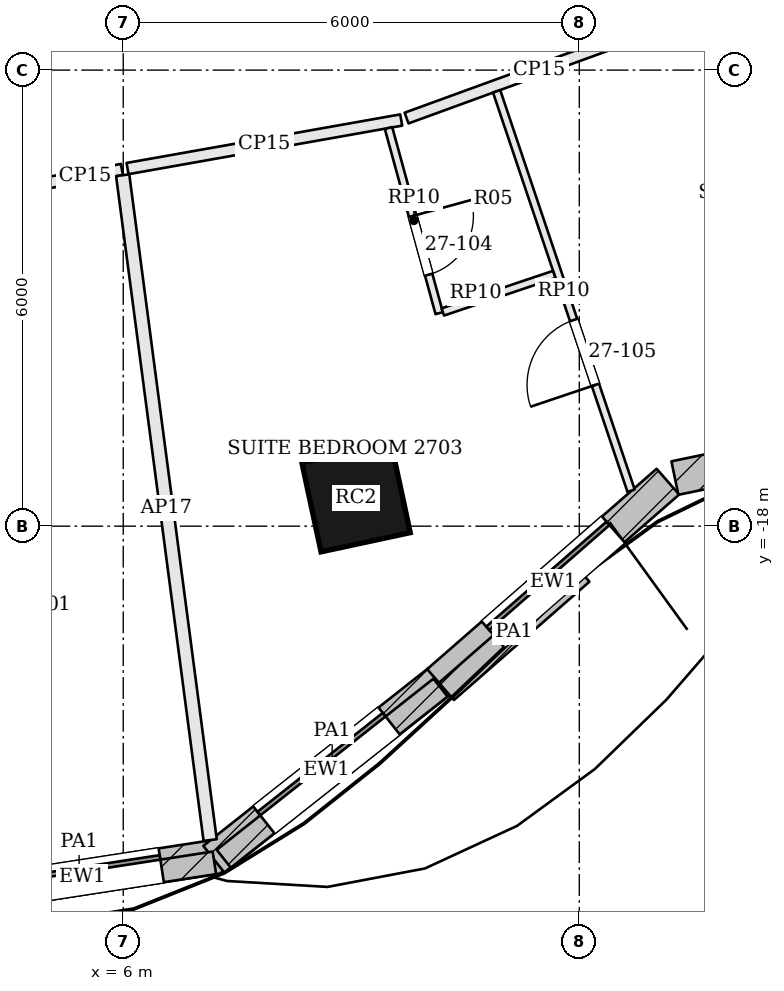
"""IFC4 building model, lengths in metres.
Left out: names, types, materials, properties, quantities, classifications, styles, units other than length and angle.
Written with IfcOpenShell. Run it as: python <this file> out.ifc"""

import sys

from ifc_helpers import new_model, si_unit, direction, frame, frame_2d, origin, origin_2d, place, context, subcontext, project, spatial, rectangle, extrude, element, fill, save


model = new_model("IFC4")
c1 = context("Model", 3, precision=1e-05, world=origin(), true_north=direction((0.0, 1.0)))
c2 = subcontext(c1, "Body", "Model", "MODEL_VIEW")
j1 = project(units=[si_unit("LENGTHUNIT", "METRE"), si_unit("PLANEANGLEUNIT", "RADIAN")], contexts=[c1])
p1 = place(None, origin())
s1 = spatial("IfcSite", under=j1, at=p1, CompositionType="ELEMENT")
p2 = place(p1, origin())
s2 = spatial("IfcBuilding", under=s1, at=p2, CompositionType="ELEMENT")
p3 = place(p2, frame((0.0, 0.0, 114.0)))
s3 = spatial("IfcBuildingStorey", under=s2, at=p3, CompositionType="ELEMENT", Elevation=114.0)
p4 = place(p3, frame((9.063, -17.625, 0.0), z_axis=(0.0, 0.0, 1.0), x_axis=(0.977652674797, 0.210226657352, 0.0)))
e1 = element("IfcColumn", 1, at=p4, inside=s3, PredefinedType="COLUMN", context=c2, shape_type="SweptSolid", body=[
    extrude(rectangle(XDim=1.2, YDim=1.2, at=origin_2d()), origin(), (0.0, 0.0, 1.0), 3.6),
])
p5 = place(p3, frame((3.629, -22.905, 0.0), z_axis=(0.0, 0.0, 1.0), x_axis=(0.988300084321, 0.152521943772, 0.0)))
e2 = element("IfcWall", 2, at=p5, inside=s3, PredefinedType="SOLIDWALL", context=c2, shape_type="SweptSolid", body=[
    extrude(rectangle(XDim=3.71, YDim=0.45, at=frame_2d((1.855, 0.0))), origin(), (0.0, 0.0, 1.0), 3.4),
])
p6 = place(p5, frame((0.805, 0.0, 0.9)))
e3 = element("IfcOpeningElement", 3, at=p6, cuts=e2, PredefinedType="OPENING", context=c2, shape_type="SweptSolid", body=[
    extrude(rectangle(XDim=2.1, YDim=2.0, at=frame_2d((1.05, 1.0))), frame((0.0, 0.235, 0.0), z_axis=(0.0, -1.0, 0.0), x_axis=(1.0, 0.0, 0.0)), (0.0, 0.0, 1.0), 0.47),
])
p7 = place(p3, frame((7.193, -22.383, 0.0), z_axis=(0.0, 0.0, 1.0), x_axis=(0.784803291184, 0.619744942816, 0.0)))
e4 = element("IfcWall", 4, at=p7, inside=s3, PredefinedType="SOLIDWALL", context=c2, shape_type="SweptSolid", body=[
    extrude(rectangle(XDim=3.775, YDim=0.45, at=frame_2d((1.887, 0.0))), origin(), (0.0, 0.0, 1.0), 3.4),
])
p8 = place(p7, frame((0.837, 0.0, 0.9)))
e5 = element("IfcOpeningElement", 5, at=p8, cuts=e4, PredefinedType="OPENING", context=c2, shape_type="SweptSolid", body=[
    extrude(rectangle(XDim=2.1, YDim=2.0, at=frame_2d((1.05, 1.0))), frame((0.0, 0.235, 0.0), z_axis=(0.0, -1.0, 0.0), x_axis=(1.0, 0.0, 0.0)), (0.0, 0.0, 1.0), 0.47),
])
p9 = place(p3, frame((10.146, -20.051, 0.0), z_axis=(0.0, 0.0, 1.0), x_axis=(0.753278140428, 0.657702093013, 0.0)))
e6 = element("IfcWall", 6, at=p9, inside=s3, PredefinedType="SOLIDWALL", context=c2, shape_type="SweptSolid", body=[
    extrude(rectangle(XDim=4.008, YDim=0.45, at=frame_2d((2.004, 0.0))), origin(), (0.0, 0.0, 1.0), 3.4),
])
p10 = place(p9, frame((0.954, 0.0, 0.9)))
e7 = element("IfcOpeningElement", 7, at=p10, cuts=e6, PredefinedType="OPENING", context=c2, shape_type="SweptSolid", body=[
    extrude(rectangle(XDim=2.1, YDim=2.0, at=frame_2d((1.05, 1.0))), frame((0.0, 0.235, 0.0), z_axis=(0.0, -1.0, 0.0), x_axis=(1.0, 0.0, 0.0)), (0.0, 0.0, 1.0), 0.47),
])
p11 = place(p3, frame((13.258, -17.367, 0.0), z_axis=(0.0, 0.0, 1.0), x_axis=(0.97914968674, 0.203140077183, 0.0)))
e8 = element("IfcWall", 8, at=p11, inside=s3, PredefinedType="SOLIDWALL", context=c2, shape_type="SweptSolid", body=[
    extrude(rectangle(XDim=3.7, YDim=0.45, at=frame_2d((1.85, 0.0))), origin(), (0.0, 0.0, 1.0), 3.4),
])
p12 = place(p11, frame((0.8, 0.0, 0.9)))
e9 = element("IfcOpeningElement", 9, at=p12, cuts=e8, PredefinedType="OPENING", context=c2, shape_type="SweptSolid", body=[
    extrude(rectangle(XDim=2.1, YDim=2.0, at=frame_2d((1.05, 1.0))), frame((0.0, 0.235, 0.0), z_axis=(0.0, -1.0, 0.0), x_axis=(1.0, 0.0, 0.0)), (0.0, 0.0, 1.0), 0.47),
])
p13 = place(p3, frame((3.64, -22.979, 3.6), z_axis=(0.0, 0.0, 1.0), x_axis=(0.988299486994, 0.152525814235, 0.0)))
e10 = element("IfcWall", 10, at=p13, inside=s3, PredefinedType="PARAPET", context=c2, shape_type="SweptSolid", body=[
    extrude(rectangle(XDim=3.602, YDim=0.3, at=frame_2d((1.801, 0.0))), origin(), (0.0, 0.0, 1.0), 1.1),
])
p14 = place(p3, frame((7.323, -22.376, 3.6), z_axis=(0.0, 0.0, 1.0), x_axis=(0.784819122577, 0.61972489448, 0.0)))
e11 = element("IfcWall", 11, at=p14, inside=s3, PredefinedType="PARAPET", context=c2, shape_type="SweptSolid", body=[
    extrude(rectangle(XDim=3.633, YDim=0.3, at=frame_2d((1.817, 0.0))), origin(), (0.0, 0.0, 1.0), 1.1),
])
p15 = place(p3, frame((10.252, -20.174, 3.6), z_axis=(0.0, 0.0, 1.0), x_axis=(0.753260147018, 0.657722700622, 0.0)))
e12 = element("IfcWall", 12, at=p15, inside=s3, PredefinedType="PARAPET", context=c2, shape_type="SweptSolid", body=[
    extrude(rectangle(XDim=2.366, YDim=0.3, at=frame_2d((1.183, 0.0))), origin(), (0.0, 0.0, 1.0), 1.1),
])
p16 = place(p3, frame((5.015, -13.48, 0.0), z_axis=(0.0, 0.0, 1.0), x_axis=(0.984650804906, 0.174535934405, 0.0)))
e13 = element("IfcWall", 13, at=p16, inside=s3, PredefinedType="PARTITIONING", context=c2, shape_type="SweptSolid", body=[
    extrude(rectangle(XDim=0.983, YDim=0.15, at=frame_2d((0.492, 0.0))), origin(), (0.0, 0.0, 1.0), 2.784),
])
p17 = place(p3, frame((7.144, -22.13, 0.0), z_axis=(0.0, 0.0, 1.0), x_axis=(-0.13045236501, 0.991454578114, 0.0)))
e14 = element("IfcWall", 14, at=p17, inside=s3, PredefinedType="PARTITIONING", context=c2, shape_type="SweptSolid", body=[
    extrude(rectangle(XDim=8.822, YDim=0.175, at=frame_2d((4.411, 0.0))), origin(), (0.0, 0.0, 1.0), 2.784),
])
p18 = place(p3, frame((6.057, -13.295, 0.0), z_axis=(0.0, 0.0, 1.0), x_axis=(0.984639377301, 0.174600391377, 0.0)))
e15 = element("IfcWall", 15, at=p18, inside=s3, PredefinedType="PARTITIONING", context=c2, shape_type="SweptSolid", body=[
    extrude(rectangle(XDim=3.656, YDim=0.15, at=frame_2d((1.828, 0.0))), origin(), (0.0, 0.0, 1.0), 2.784),
])
p19 = place(p3, frame((9.728, -12.631, 0.0), z_axis=(0.0, 0.0, 1.0), x_axis=(0.939626438181, 0.342201923826, 0.0)))
e16 = element("IfcWall", 16, at=p19, inside=s3, PredefinedType="PARTITIONING", context=c2, shape_type="SweptSolid", body=[
    extrude(rectangle(XDim=3.716, YDim=0.15, at=frame_2d((1.858, 0.0))), origin(), (0.0, 0.0, 1.0), 2.784),
])
p20 = place(p3, frame((12.681, -17.533, 0.0), z_axis=(0.0, 0.0, 1.0), x_axis=(-0.319066902685, 0.947732194035, 0.0)))
e17 = element("IfcWall", 17, at=p20, inside=s3, PredefinedType="PARTITIONING", context=c2, shape_type="SweptSolid", body=[
    extrude(rectangle(XDim=5.544, YDim=0.1, at=frame_2d((2.772, 0.0))), origin(), (0.0, 0.0, 1.0), 2.884),
])
p21 = place(p20, frame((1.469, 0.0, 0.0)))
e18 = element("IfcOpeningElement", 18, at=p21, cuts=e17, PredefinedType="OPENING", context=c2, shape_type="SweptSolid", body=[
    extrude(rectangle(XDim=0.9, YDim=2.4, at=frame_2d((0.45, 1.2))), frame((0.0, 0.06, 0.0), z_axis=(0.0, -1.0, 0.0), x_axis=(1.0, 0.0, 0.0)), (0.0, 0.0, 1.0), 0.12),
])
p22 = place(p3, frame((9.49, -12.762, 0.0), z_axis=(0.0, 0.0, 1.0), x_axis=(0.264041724806, -0.96451125839, 0.0)))
e19 = element("IfcWall", 19, at=p22, inside=s3, PredefinedType="PARTITIONING", context=c2, shape_type="SweptSolid", body=[
    extrude(rectangle(XDim=2.525, YDim=0.1, at=frame_2d((1.263, 0.0))), origin(), (0.0, 0.0, 1.0), 2.884),
])
p23 = place(p22, frame((1.2, 0.0, 0.0)))
e20 = element("IfcOpeningElement", 20, at=p23, cuts=e19, PredefinedType="OPENING", context=c2, shape_type="SweptSolid", body=[
    extrude(rectangle(XDim=0.8, YDim=2.1, at=frame_2d((0.4, 1.05))), frame((0.0, 0.06, 0.0), z_axis=(0.0, -1.0, 0.0), x_axis=(1.0, 0.0, 0.0)), (0.0, 0.0, 1.0), 0.12),
])
p24 = place(p3, frame((10.204, -15.182, 0.0), z_axis=(0.0, 0.0, 1.0), x_axis=(0.947779968737, 0.318924961175, 0.0)))
e21 = element("IfcWall", 21, at=p24, inside=s3, PredefinedType="PARTITIONING", context=c2, shape_type="SweptSolid", body=[
    extrude(rectangle(XDim=1.547, YDim=0.1, at=frame_2d((0.773, 0.0))), origin(), (0.0, 0.0, 1.0), 2.884),
])
p25 = place(p6, origin())
e22 = element("IfcWindow", 22, at=p25, inside=s3, PartitioningType="SINGLE_PANEL", PredefinedType="WINDOW", context=c2, shape_type="SweptSolid", body=[
    extrude(rectangle(XDim=2.1, YDim=2.0, at=frame_2d((1.05, 1.0))), frame((0.0, 0.135, 0.0), z_axis=(0.0, -1.0, 0.0), x_axis=(1.0, 0.0, 0.0)), (0.0, 0.0, 1.0), 0.06),
])
fill(e3, e22)
p26 = place(p8, origin())
e23 = element("IfcWindow", 23, at=p26, inside=s3, PartitioningType="SINGLE_PANEL", PredefinedType="WINDOW", context=c2, shape_type="SweptSolid", body=[
    extrude(rectangle(XDim=2.1, YDim=2.0, at=frame_2d((1.05, 1.0))), frame((0.0, 0.135, 0.0), z_axis=(0.0, -1.0, 0.0), x_axis=(1.0, 0.0, 0.0)), (0.0, 0.0, 1.0), 0.06),
])
fill(e5, e23)
p27 = place(p10, origin())
e24 = element("IfcWindow", 24, at=p27, inside=s3, PartitioningType="SINGLE_PANEL", PredefinedType="WINDOW", context=c2, shape_type="SweptSolid", body=[
    extrude(rectangle(XDim=2.1, YDim=2.0, at=frame_2d((1.05, 1.0))), frame((0.0, 0.135, 0.0), z_axis=(0.0, -1.0, 0.0), x_axis=(1.0, 0.0, 0.0)), (0.0, 0.0, 1.0), 0.06),
])
fill(e7, e24)
p28 = place(p23, origin())
e25 = element("IfcDoor", 25, at=p28, inside=s3, OperationType="SINGLE_SWING_LEFT", PredefinedType="DOOR", context=c2, shape_type="SweptSolid", body=[
    extrude(rectangle(XDim=0.8, YDim=2.1, at=frame_2d((0.4, 1.05))), frame((0.0, 0.025, 0.0), z_axis=(0.0, -1.0, 0.0), x_axis=(1.0, 0.0, 0.0)), (0.0, 0.0, 1.0), 0.05),
])
fill(e20, e25)
p29 = place(p21, origin())
e26 = element("IfcDoor", 26, at=p29, inside=s3, OperationType="SINGLE_SWING_LEFT", PredefinedType="DOOR", context=c2, shape_type="SweptSolid", body=[
    extrude(rectangle(XDim=0.9, YDim=2.4, at=frame_2d((0.45, 1.2))), frame((0.0, 0.025, 0.0), z_axis=(0.0, -1.0, 0.0), x_axis=(1.0, 0.0, 0.0)), (0.0, 0.0, 1.0), 0.05),
])
fill(e18, e26)
save(model, sys.argv[1])
